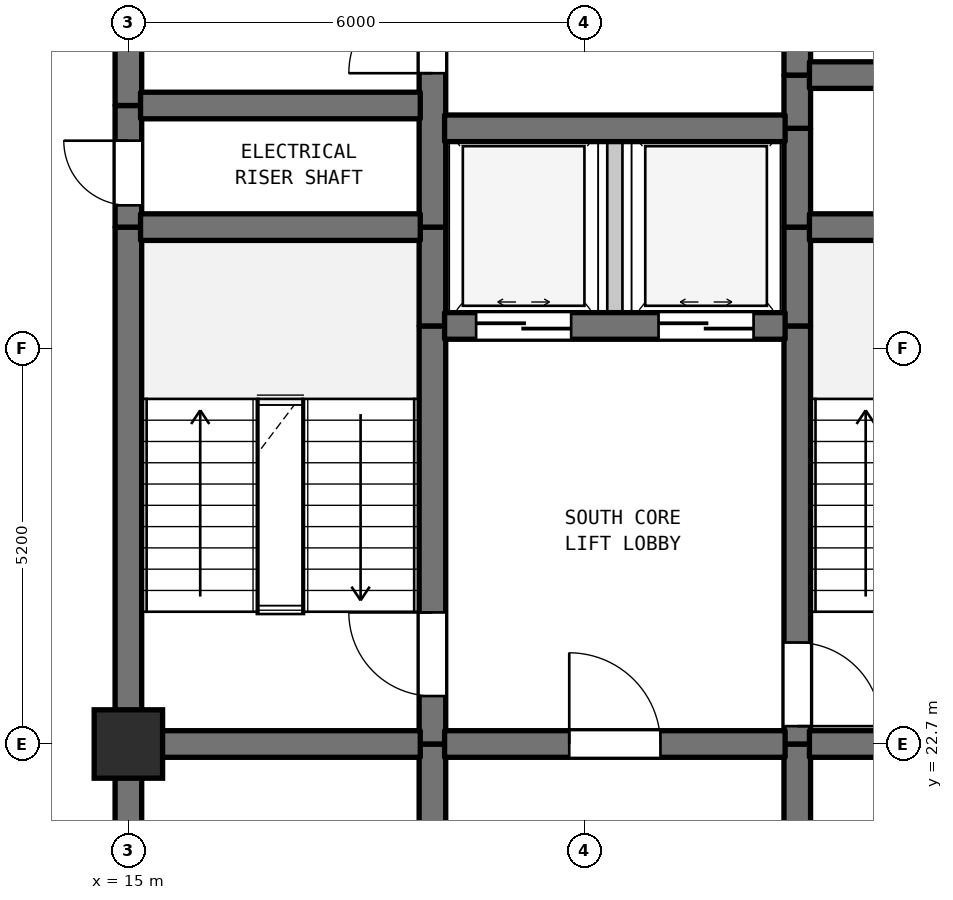
"""IFC4 building model, lengths in metres.
Left out: names, types, materials, properties, quantities, classifications, styles, units other than length and angle.
Written with IfcOpenShell. Run it as: python <this file> out.ifc"""

import sys

from ifc_helpers import new_model, si_unit, direction, frame, frame_2d, origin, origin_2d, place, context, subcontext, project, spatial, rectangle, extrude, element, fill, save


model = new_model("IFC4")
c1 = context("Model", 3, precision=1e-05, world=origin(), true_north=direction((0.0, 1.0)))
c2 = subcontext(c1, "Body", "Model", "MODEL_VIEW")
j1 = project(units=[si_unit("LENGTHUNIT", "METRE"), si_unit("PLANEANGLEUNIT", "RADIAN")], contexts=[c1])
p1 = place(None, origin())
s1 = spatial("IfcSite", under=j1, at=p1, CompositionType="ELEMENT")
p2 = place(p1, origin())
s2 = spatial("IfcBuilding", under=s1, at=p2, CompositionType="ELEMENT")
p3 = place(p2, frame((0.0, 0.0, 133.5)))
s3 = spatial("IfcBuildingStorey", under=s2, at=p3, CompositionType="ELEMENT", Elevation=133.5)
p4 = place(p3, frame((15.0, 22.7, 0.0), z_axis=(0.0, 0.0, 1.0), x_axis=(1.0, 0.0, 0.0)))
e1 = element("IfcColumn", 1, at=p4, inside=s3, PredefinedType="COLUMN", context=c2, shape_type="SweptSolid", body=[
    extrude(rectangle(XDim=0.9, YDim=0.9, at=origin_2d()), origin(), (0.0, 0.0, 1.0), 3.7),
])
p5 = place(p3, frame((15.0, 19.5, 0.0), z_axis=(0.0, 0.0, 1.0), x_axis=(0.0, 1.0, 0.0)))
e2 = element("IfcWall", 2, at=p5, inside=s3, PredefinedType="SHEAR", context=c2, shape_type="SweptSolid", body=[
    extrude(rectangle(XDim=3.2, YDim=0.35, at=frame_2d((1.6, 0.0))), origin(), (0.0, 0.0, 1.0), 3.385),
])
p6 = place(p3, frame((15.0, 22.7, 0.0), z_axis=(0.0, 0.0, 1.0), x_axis=(0.0, 1.0, 0.0)))
e3 = element("IfcWall", 3, at=p6, inside=s3, PredefinedType="SHEAR", context=c2, shape_type="SweptSolid", body=[
    extrude(rectangle(XDim=6.8, YDim=0.35, at=frame_2d((3.4, 0.0))), origin(), (0.0, 0.0, 1.0), 3.385),
])
p7 = place(p3, frame((15.0, 29.5, 0.0), z_axis=(0.0, 0.0, 1.0), x_axis=(0.0, 1.0, 0.0)))
e4 = element("IfcWall", 4, at=p7, inside=s3, PredefinedType="SHEAR", context=c2, shape_type="SweptSolid", body=[
    extrude(rectangle(XDim=1.6, YDim=0.35, at=frame_2d((0.8, 0.0))), origin(), (0.0, 0.0, 1.0), 3.385),
])
p8 = place(p7, frame((0.287, 0.0, 0.0)))
e5 = element("IfcOpeningElement", 5, at=p8, cuts=e4, PredefinedType="OPENING", context=c2, shape_type="SweptSolid", body=[
    extrude(rectangle(XDim=0.85, YDim=2.1, at=frame_2d((0.425, 1.05))), frame((0.0, 0.185, 0.0), z_axis=(0.0, -1.0, 0.0), x_axis=(1.0, 0.0, 0.0)), (0.0, 0.0, 1.0), 0.37),
])
p9 = place(p3, frame((15.0, 31.1, 0.0), z_axis=(0.0, 0.0, 1.0), x_axis=(0.0, 1.0, 0.0)))
e6 = element("IfcWall", 6, at=p9, inside=s3, PredefinedType="SHEAR", context=c2, shape_type="SweptSolid", body=[
    extrude(rectangle(XDim=6.8, YDim=0.35, at=frame_2d((3.4, 0.0))), origin(), (0.0, 0.0, 1.0), 3.385),
])
p10 = place(p3, frame((19.0, 19.5, 0.0), z_axis=(0.0, 0.0, 1.0), x_axis=(0.0, 1.0, 0.0)))
e7 = element("IfcWall", 7, at=p10, inside=s3, PredefinedType="SHEAR", context=c2, shape_type="SweptSolid", body=[
    extrude(rectangle(XDim=3.2, YDim=0.35, at=frame_2d((1.6, 0.0))), origin(), (0.0, 0.0, 1.0), 3.385),
])
p11 = place(p3, frame((19.0, 22.7, 0.0), z_axis=(0.0, 0.0, 1.0), x_axis=(0.0, 1.0, 0.0)))
e8 = element("IfcWall", 8, at=p11, inside=s3, PredefinedType="SHEAR", context=c2, shape_type="SweptSolid", body=[
    extrude(rectangle(XDim=5.5, YDim=0.35, at=frame_2d((2.75, 0.0))), origin(), (0.0, 0.0, 1.0), 3.385),
])
p12 = place(p11, frame((0.631, 0.0, 0.0)))
e9 = element("IfcOpeningElement", 9, at=p12, cuts=e8, PredefinedType="OPENING", context=c2, shape_type="SweptSolid", body=[
    extrude(rectangle(XDim=1.1, YDim=2.15, at=frame_2d((0.55, 1.075))), frame((0.0, 0.185, 0.0), z_axis=(0.0, -1.0, 0.0), x_axis=(1.0, 0.0, 0.0)), (0.0, 0.0, 1.0), 0.37),
])
p13 = place(p3, frame((19.0, 28.2, 0.0), z_axis=(0.0, 0.0, 1.0), x_axis=(0.0, 1.0, 0.0)))
e10 = element("IfcWall", 10, at=p13, inside=s3, PredefinedType="SHEAR", context=c2, shape_type="SweptSolid", body=[
    extrude(rectangle(XDim=1.3, YDim=0.35, at=frame_2d((0.65, 0.0))), origin(), (0.0, 0.0, 1.0), 3.385),
])
p14 = place(p3, frame((19.0, 29.5, 0.0), z_axis=(0.0, 0.0, 1.0), x_axis=(0.0, 1.0, 0.0)))
e11 = element("IfcWall", 11, at=p14, inside=s3, PredefinedType="SHEAR", context=c2, shape_type="SweptSolid", body=[
    extrude(rectangle(XDim=5.5, YDim=0.35, at=frame_2d((2.75, 0.0))), origin(), (0.0, 0.0, 1.0), 3.385),
])
p15 = place(p14, frame((2.025, 0.0, 0.0)))
e12 = element("IfcOpeningElement", 12, at=p15, cuts=e11, PredefinedType="OPENING", context=c2, shape_type="SweptSolid", body=[
    extrude(rectangle(XDim=1.1, YDim=2.15, at=frame_2d((0.55, 1.075))), frame((0.0, 0.185, 0.0), z_axis=(0.0, -1.0, 0.0), x_axis=(1.0, 0.0, 0.0)), (0.0, 0.0, 1.0), 0.37),
])
p16 = place(p3, frame((21.4, 28.2, 0.0), z_axis=(0.0, 0.0, 1.0), x_axis=(0.0, 1.0, 0.0)))
e13 = element("IfcWall", 13, at=p16, inside=s3, PredefinedType="STANDARD", context=c2, shape_type="SweptSolid", body=[
    extrude(rectangle(XDim=2.6, YDim=0.2, at=frame_2d((1.3, 0.0))), origin(), (0.0, 0.0, 1.0), 3.385),
])
p17 = place(p3, frame((23.8, 19.5, 0.0), z_axis=(0.0, 0.0, 1.0), x_axis=(0.0, 1.0, 0.0)))
e14 = element("IfcWall", 14, at=p17, inside=s3, PredefinedType="SHEAR", context=c2, shape_type="SweptSolid", body=[
    extrude(rectangle(XDim=3.2, YDim=0.35, at=frame_2d((1.6, 0.0))), origin(), (0.0, 0.0, 1.0), 3.385),
])
p18 = place(p3, frame((23.8, 22.7, 0.0), z_axis=(0.0, 0.0, 1.0), x_axis=(0.0, 1.0, 0.0)))
e15 = element("IfcWall", 15, at=p18, inside=s3, PredefinedType="SHEAR", context=c2, shape_type="SweptSolid", body=[
    extrude(rectangle(XDim=5.5, YDim=0.35, at=frame_2d((2.75, 0.0))), origin(), (0.0, 0.0, 1.0), 3.385),
])
p19 = place(p18, frame((0.235, 0.0, 0.0)))
e16 = element("IfcOpeningElement", 16, at=p19, cuts=e15, PredefinedType="OPENING", context=c2, shape_type="SweptSolid", body=[
    extrude(rectangle(XDim=1.1, YDim=2.15, at=frame_2d((0.55, 1.075))), frame((0.0, 0.185, 0.0), z_axis=(0.0, -1.0, 0.0), x_axis=(1.0, 0.0, 0.0)), (0.0, 0.0, 1.0), 0.37),
])
for number, where, z_axis, x_axis in (
    (17, (23.8, 28.2, 0.0), (0.0, 0.0, 1.0), (0.0, 1.0, 0.0)),
    (18, (23.8, 29.5, 0.0), (0.0, 0.0, 1.0), (0.0, 1.0, 0.0)),
):
    element("IfcWall", number, at=place(p3, frame(where, z_axis=z_axis, x_axis=x_axis)), inside=s3, PredefinedType="SHEAR", context=c2, shape_type="SweptSolid", body=[
        extrude(rectangle(XDim=1.3, YDim=0.35, at=frame_2d((0.65, 0.0))), origin(), (0.0, 0.0, 1.0), 3.385),
    ])
p20 = place(p3, frame((23.8, 30.8, 0.0), z_axis=(0.0, 0.0, 1.0), x_axis=(0.0, 1.0, 0.0)))
e19 = element("IfcWall", 19, at=p20, inside=s3, PredefinedType="SHEAR", context=c2, shape_type="SweptSolid", body=[
    extrude(rectangle(XDim=0.7, YDim=0.35, at=frame_2d((0.35, 0.0))), origin(), (0.0, 0.0, 1.0), 3.385),
])
p21 = place(p3, frame((23.8, 31.5, 0.0), z_axis=(0.0, 0.0, 1.0), x_axis=(0.0, 1.0, 0.0)))
e20 = element("IfcWall", 20, at=p21, inside=s3, PredefinedType="SHEAR", context=c2, shape_type="SweptSolid", body=[
    extrude(rectangle(XDim=3.5, YDim=0.35, at=frame_2d((1.75, 0.0))), origin(), (0.0, 0.0, 1.0), 3.385),
])
p22 = place(p21, frame((1.127, 0.0, 0.0)))
e21 = element("IfcOpeningElement", 21, at=p22, cuts=e20, PredefinedType="OPENING", context=c2, shape_type="SweptSolid", body=[
    extrude(rectangle(XDim=1.1, YDim=2.15, at=frame_2d((0.55, 1.075))), frame((0.0, 0.185, 0.0), z_axis=(0.0, -1.0, 0.0), x_axis=(1.0, 0.0, 0.0)), (0.0, 0.0, 1.0), 0.37),
])
p23 = place(p3, frame((15.16, 22.7, 0.0), z_axis=(0.0, 0.0, 1.0), x_axis=(1.0, 0.0, 0.0)))
e22 = element("IfcWall", 22, at=p23, inside=s3, PredefinedType="SHEAR", context=c2, shape_type="SweptSolid", body=[
    extrude(rectangle(XDim=3.68, YDim=0.35, at=frame_2d((1.84, 0.0))), origin(), (0.0, 0.0, 1.0), 3.385),
])
p24 = place(p3, frame((19.16, 22.7, 0.0), z_axis=(0.0, 0.0, 1.0), x_axis=(1.0, 0.0, 0.0)))
e23 = element("IfcWall", 23, at=p24, inside=s3, PredefinedType="SHEAR", context=c2, shape_type="SweptSolid", body=[
    extrude(rectangle(XDim=4.48, YDim=0.35, at=frame_2d((2.24, 0.0))), origin(), (0.0, 0.0, 1.0), 3.385),
])
p25 = place(p24, frame((1.64, 0.0, 0.0)))
e24 = element("IfcOpeningElement", 24, at=p25, cuts=e23, PredefinedType="OPENING", context=c2, shape_type="SweptSolid", body=[
    extrude(rectangle(XDim=1.2, YDim=2.2, at=frame_2d((0.6, 1.1))), frame((0.0, 0.185, 0.0), z_axis=(0.0, -1.0, 0.0), x_axis=(1.0, 0.0, 0.0)), (0.0, 0.0, 1.0), 0.37),
])
p26 = place(p3, frame((23.96, 22.7, 0.0), z_axis=(0.0, 0.0, 1.0), x_axis=(1.0, 0.0, 0.0)))
e25 = element("IfcWall", 25, at=p26, inside=s3, PredefinedType="SHEAR", context=c2, shape_type="SweptSolid", body=[
    extrude(rectangle(XDim=3.18, YDim=0.35, at=frame_2d((1.59, 0.0))), origin(), (0.0, 0.0, 1.0), 3.385),
])
p27 = place(p3, frame((19.16, 28.2, 0.0), z_axis=(0.0, 0.0, 1.0), x_axis=(1.0, 0.0, 0.0)))
e26 = element("IfcWall", 26, at=p27, inside=s3, PredefinedType="SHEAR", context=c2, shape_type="SweptSolid", body=[
    extrude(rectangle(XDim=4.48, YDim=0.35, at=frame_2d((2.24, 0.0))), origin(), (0.0, 0.0, 1.0), 3.385),
])
p28 = place(p27, frame((0.415, 0.0, 0.0)))
e27 = element("IfcOpeningElement", 27, at=p28, cuts=e26, PredefinedType="OPENING", context=c2, shape_type="SweptSolid", body=[
    extrude(rectangle(XDim=1.25, YDim=2.2, at=frame_2d((0.625, 1.1))), frame((0.0, 0.185, 0.0), z_axis=(0.0, -1.0, 0.0), x_axis=(1.0, 0.0, 0.0)), (0.0, 0.0, 1.0), 0.37),
])
p29 = place(p27, frame((2.815, 0.0, 0.0)))
e28 = element("IfcOpeningElement", 28, at=p29, cuts=e26, PredefinedType="OPENING", context=c2, shape_type="SweptSolid", body=[
    extrude(rectangle(XDim=1.25, YDim=2.2, at=frame_2d((0.625, 1.1))), frame((0.0, 0.185, 0.0), z_axis=(0.0, -1.0, 0.0), x_axis=(1.0, 0.0, 0.0)), (0.0, 0.0, 1.0), 0.37),
])
p30 = place(p3, frame((15.16, 29.5, 0.0), z_axis=(0.0, 0.0, 1.0), x_axis=(1.0, 0.0, 0.0)))
e29 = element("IfcWall", 29, at=p30, inside=s3, PredefinedType="SHEAR", context=c2, shape_type="SweptSolid", body=[
    extrude(rectangle(XDim=3.68, YDim=0.35, at=frame_2d((1.84, 0.0))), origin(), (0.0, 0.0, 1.0), 3.385),
])
p31 = place(p3, frame((23.96, 29.5, 0.0), z_axis=(0.0, 0.0, 1.0), x_axis=(1.0, 0.0, 0.0)))
e30 = element("IfcWall", 30, at=p31, inside=s3, PredefinedType="SHEAR", context=c2, shape_type="SweptSolid", body=[
    extrude(rectangle(XDim=3.18, YDim=0.35, at=frame_2d((1.59, 0.0))), origin(), (0.0, 0.0, 1.0), 3.385),
])
p32 = place(p3, frame((19.16, 30.8, 0.0), z_axis=(0.0, 0.0, 1.0), x_axis=(1.0, 0.0, 0.0)))
e31 = element("IfcWall", 31, at=p32, inside=s3, PredefinedType="SHEAR", context=c2, shape_type="SweptSolid", body=[
    extrude(rectangle(XDim=4.48, YDim=0.35, at=frame_2d((2.24, 0.0))), origin(), (0.0, 0.0, 1.0), 3.385),
])
p33 = place(p3, frame((15.16, 31.1, 0.0), z_axis=(0.0, 0.0, 1.0), x_axis=(1.0, 0.0, 0.0)))
e32 = element("IfcWall", 32, at=p33, inside=s3, PredefinedType="SHEAR", context=c2, shape_type="SweptSolid", body=[
    extrude(rectangle(XDim=3.68, YDim=0.35, at=frame_2d((1.84, 0.0))), origin(), (0.0, 0.0, 1.0), 3.385),
])
p34 = place(p3, frame((23.96, 31.5, 0.0), z_axis=(0.0, 0.0, 1.0), x_axis=(1.0, 0.0, 0.0)))
e33 = element("IfcWall", 33, at=p34, inside=s3, PredefinedType="SHEAR", context=c2, shape_type="SweptSolid", body=[
    extrude(rectangle(XDim=3.18, YDim=0.35, at=frame_2d((1.59, 0.0))), origin(), (0.0, 0.0, 1.0), 3.385),
])
p35 = place(p34, frame((1.094, 0.0, 0.0)))
e34 = element("IfcOpeningElement", 34, at=p35, cuts=e33, PredefinedType="OPENING", context=c2, shape_type="SweptSolid", body=[
    extrude(rectangle(XDim=0.85, YDim=2.1, at=frame_2d((0.425, 1.05))), frame((0.0, 0.185, 0.0), z_axis=(0.0, -1.0, 0.0), x_axis=(1.0, 0.0, 0.0)), (0.0, 0.0, 1.0), 0.37),
])
p36 = place(p8, origin())
e35 = element("IfcDoor", 35, at=p36, inside=s3, OperationType="SINGLE_SWING_RIGHT", PredefinedType="DOOR", context=c2, shape_type="SweptSolid", body=[
    extrude(rectangle(XDim=0.85, YDim=2.1, at=frame_2d((0.425, 1.05))), frame((0.0, 0.025, 0.0), z_axis=(0.0, -1.0, 0.0), x_axis=(1.0, 0.0, 0.0)), (0.0, 0.0, 1.0), 0.05),
])
fill(e5, e35)
p37 = place(p12, origin())
e36 = element("IfcDoor", 36, at=p37, inside=s3, OperationType="SINGLE_SWING_RIGHT", PredefinedType="DOOR", context=c2, shape_type="SweptSolid", body=[
    extrude(rectangle(XDim=1.1, YDim=2.15, at=frame_2d((0.55, 1.075))), frame((0.0, 0.025, 0.0), z_axis=(0.0, -1.0, 0.0), x_axis=(1.0, 0.0, 0.0)), (0.0, 0.0, 1.0), 0.05),
])
fill(e9, e36)
p38 = place(p15, origin())
e37 = element("IfcDoor", 37, at=p38, inside=s3, OperationType="SINGLE_SWING_LEFT", PredefinedType="DOOR", context=c2, shape_type="SweptSolid", body=[
    extrude(rectangle(XDim=1.1, YDim=2.15, at=frame_2d((0.55, 1.075))), frame((0.0, 0.025, 0.0), z_axis=(0.0, -1.0, 0.0), x_axis=(1.0, 0.0, 0.0)), (0.0, 0.0, 1.0), 0.05),
])
fill(e12, e37)
p39 = place(p19, frame((1.1, 0.0, 0.0), z_axis=(0.0, 0.0, 1.0), x_axis=(-1.0, 0.0, 0.0)))
e38 = element("IfcDoor", 38, at=p39, inside=s3, OperationType="SINGLE_SWING_LEFT", PredefinedType="DOOR", context=c2, shape_type="SweptSolid", body=[
    extrude(rectangle(XDim=1.1, YDim=2.15, at=frame_2d((0.55, 1.075))), frame((0.0, 0.025, 0.0), z_axis=(0.0, -1.0, 0.0), x_axis=(1.0, 0.0, 0.0)), (0.0, 0.0, 1.0), 0.05),
])
fill(e16, e38)
p40 = place(p25, origin())
e39 = element("IfcDoor", 39, at=p40, inside=s3, OperationType="SINGLE_SWING_LEFT", PredefinedType="DOOR", context=c2, shape_type="SweptSolid", body=[
    extrude(rectangle(XDim=1.2, YDim=2.2, at=frame_2d((0.6, 1.1))), frame((0.0, 0.025, 0.0), z_axis=(0.0, -1.0, 0.0), x_axis=(1.0, 0.0, 0.0)), (0.0, 0.0, 1.0), 0.05),
])
fill(e24, e39)
p41 = place(p28, origin())
e40 = element("IfcDoor", 40, at=p41, inside=s3, OperationType="DOUBLE_DOOR_SLIDING", PredefinedType="DOOR", context=c2, shape_type="SweptSolid", body=[
    extrude(rectangle(XDim=1.25, YDim=2.2, at=frame_2d((0.625, 1.1))), frame((0.0, 0.025, 0.0), z_axis=(0.0, -1.0, 0.0), x_axis=(1.0, 0.0, 0.0)), (0.0, 0.0, 1.0), 0.05),
])
fill(e27, e40)
p42 = place(p29, origin())
e41 = element("IfcDoor", 41, at=p42, inside=s3, OperationType="DOUBLE_DOOR_SLIDING", PredefinedType="DOOR", context=c2, shape_type="SweptSolid", body=[
    extrude(rectangle(XDim=1.25, YDim=2.2, at=frame_2d((0.625, 1.1))), frame((0.0, 0.025, 0.0), z_axis=(0.0, -1.0, 0.0), x_axis=(1.0, 0.0, 0.0)), (0.0, 0.0, 1.0), 0.05),
])
fill(e28, e41)
save(model, sys.argv[1])
